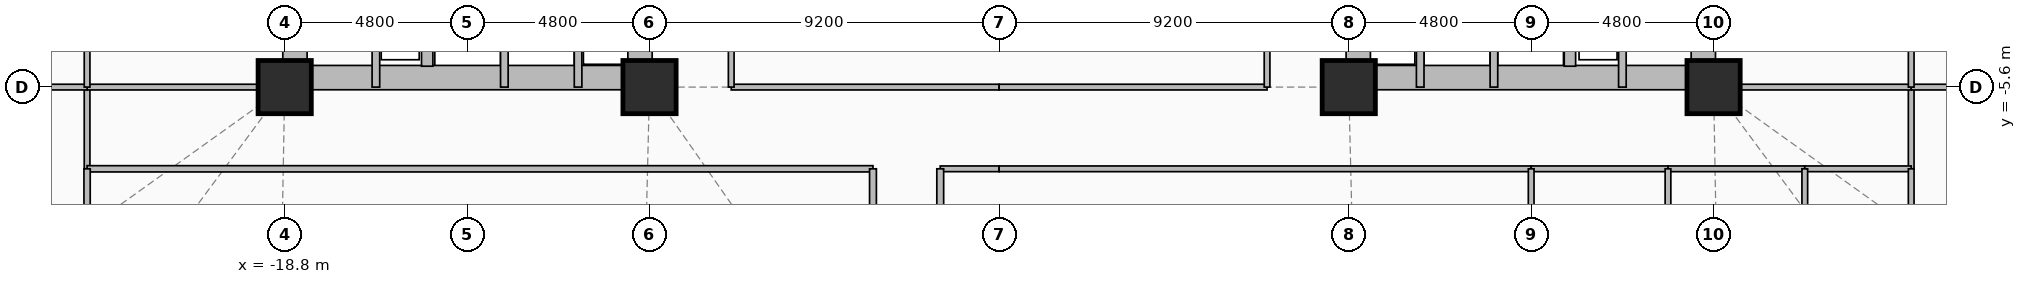
"""IFC4 building model, lengths in metres.
Left out: names, types, materials, properties, quantities, classifications, styles, units other than length and angle.
Written with IfcOpenShell. Run it as: python <this file> out.ifc"""

import sys

from ifc_helpers import new_model, si_unit, direction, frame, frame_2d, origin, origin_2d, place, context, subcontext, project, spatial, rectangle, extrude, element, fill, save


model = new_model("IFC4")
c1 = context("Model", 3, precision=1e-05, world=origin(), true_north=direction((0.0, 1.0)))
c2 = subcontext(c1, "Body", "Model", "MODEL_VIEW")
j1 = project(units=[si_unit("LENGTHUNIT", "METRE"), si_unit("PLANEANGLEUNIT", "RADIAN")], contexts=[c1])
p1 = place(None, origin())
s1 = spatial("IfcSite", under=j1, at=p1, CompositionType="ELEMENT")
p2 = place(p1, origin())
s2 = spatial("IfcBuilding", under=s1, at=p2, CompositionType="ELEMENT")
p3 = place(p2, frame((0.0, 0.0, 22.5)))
s3 = spatial("IfcBuildingStorey", under=s2, at=p3, CompositionType="ELEMENT", Elevation=22.5)
for number, where, z_axis, x_axis in (
    (1, (-18.8, -5.6, 0.0), (0.0, 0.0, 1.0), (1.0, 0.0, 0.0)),
    (2, (-9.2, -5.6, 0.0), (0.0, 0.0, 1.0), (1.0, 0.0, 0.0)),
    (3, (9.2, -5.6, 0.0), (0.0, 0.0, 1.0), (1.0, 0.0, 0.0)),
    (4, (18.8, -5.6, 0.0), (0.0, 0.0, 1.0), (1.0, 0.0, 0.0)),
):
    element("IfcColumn", number, at=place(p3, frame(where, z_axis=z_axis, x_axis=x_axis)), inside=s3, PredefinedType="COLUMN", context=c2, shape_type="SweptSolid", body=[
        extrude(rectangle(XDim=1.4, YDim=1.4, at=origin_2d()), origin(), (0.0, 0.0, 1.0), 4.5),
    ])
p4 = place(p3, frame((-18.8, -5.35, 0.0), z_axis=(0.0, 0.0, 1.0), x_axis=(1.0, 0.0, 0.0)))
e5 = element("IfcWall", 5, at=p4, inside=s3, PredefinedType="SHEAR", context=c2, shape_type="SweptSolid", body=[
    extrude(rectangle(XDim=9.6, YDim=0.64, at=frame_2d((4.8, 0.0))), origin(), (0.0, 0.0, 1.0), 4.16),
])
p5 = place(p4, frame((1.05, 0.0, 0.0)))
e6 = element("IfcOpeningElement", 6, at=p5, cuts=e5, PredefinedType="OPENING", context=c2, shape_type="SweptSolid", body=[
    extrude(rectangle(XDim=0.9, YDim=2.1, at=frame_2d((0.45, 1.05))), frame((0.0, 0.33, 0.0), z_axis=(0.0, -1.0, 0.0), x_axis=(1.0, 0.0, 0.0)), (0.0, 0.0, 1.0), 0.66),
])
p6 = place(p3, frame((-18.53, -5.05, 0.0), z_axis=(0.0, 0.0, 1.0), x_axis=(0.0, 1.0, 0.0)))
e7 = element("IfcWall", 7, at=p6, inside=s3, PredefinedType="SHEAR", context=c2, shape_type="SweptSolid", body=[
    extrude(rectangle(XDim=10.1, YDim=0.64, at=frame_2d((5.05, 0.0))), origin(), (0.0, 0.0, 1.0), 4.16),
])
p7 = place(p3, frame((-9.45, -5.05, 0.0), z_axis=(0.0, 0.0, 1.0), x_axis=(0.0, 1.0, 0.0)))
e8 = element("IfcWall", 8, at=p7, inside=s3, PredefinedType="SHEAR", context=c2, shape_type="SweptSolid", body=[
    extrude(rectangle(XDim=10.1, YDim=0.64, at=frame_2d((5.05, 0.0))), origin(), (0.0, 0.0, 1.0), 4.16),
])
p8 = place(p7, frame((7.175, 0.0, 0.0)))
e9 = element("IfcOpeningElement", 9, at=p8, cuts=e8, PredefinedType="OPENING", context=c2, shape_type="SweptSolid", body=[
    extrude(rectangle(XDim=0.9, YDim=2.1, at=frame_2d((0.45, 1.05))), frame((0.0, 0.33, 0.0), z_axis=(0.0, -1.0, 0.0), x_axis=(1.0, 0.0, 0.0)), (0.0, 0.0, 1.0), 0.66),
])
p9 = place(p7, frame((2.4, 0.0, 0.0)))
e10 = element("IfcOpeningElement", 10, at=p9, cuts=e8, PredefinedType="OPENING", context=c2, shape_type="SweptSolid", body=[
    extrude(rectangle(XDim=1.2, YDim=2.15, at=frame_2d((0.6, 1.075))), frame((0.0, 0.33, 0.0), z_axis=(0.0, -1.0, 0.0), x_axis=(1.0, 0.0, 0.0)), (0.0, 0.0, 1.0), 0.66),
])
p10 = place(p3, frame((-15.05, -5.05, 0.0), z_axis=(0.0, 0.0, 1.0), x_axis=(0.0, 1.0, 0.0)))
e11 = element("IfcWall", 11, at=p10, inside=s3, PredefinedType="SHEAR", context=c2, shape_type="SweptSolid", body=[
    extrude(rectangle(XDim=10.1, YDim=0.3, at=frame_2d((5.05, 0.0))), origin(), (0.0, 0.0, 1.0), 4.16),
])
p11 = place(p3, frame((9.2, -5.35, 0.0), z_axis=(0.0, 0.0, 1.0), x_axis=(1.0, 0.0, 0.0)))
e12 = element("IfcWall", 12, at=p11, inside=s3, PredefinedType="SHEAR", context=c2, shape_type="SweptSolid", body=[
    extrude(rectangle(XDim=9.6, YDim=0.64, at=frame_2d((4.8, 0.0))), origin(), (0.0, 0.0, 1.0), 4.16),
])
p12 = place(p11, frame((7.65, 0.0, 0.0)))
e13 = element("IfcOpeningElement", 13, at=p12, cuts=e12, PredefinedType="OPENING", context=c2, shape_type="SweptSolid", body=[
    extrude(rectangle(XDim=0.9, YDim=2.1, at=frame_2d((0.45, 1.05))), frame((0.0, 0.33, 0.0), z_axis=(0.0, -1.0, 0.0), x_axis=(1.0, 0.0, 0.0)), (0.0, 0.0, 1.0), 0.66),
])
p13 = place(p3, frame((9.45, -5.05, 0.0), z_axis=(0.0, 0.0, 1.0), x_axis=(0.0, 1.0, 0.0)))
e14 = element("IfcWall", 14, at=p13, inside=s3, PredefinedType="SHEAR", context=c2, shape_type="SweptSolid", body=[
    extrude(rectangle(XDim=10.1, YDim=0.64, at=frame_2d((5.05, 0.0))), origin(), (0.0, 0.0, 1.0), 4.16),
])
p14 = place(p13, frame((7.15, 0.0, 0.0)))
e15 = element("IfcOpeningElement", 15, at=p14, cuts=e14, PredefinedType="OPENING", context=c2, shape_type="SweptSolid", body=[
    extrude(rectangle(XDim=0.9, YDim=2.1, at=frame_2d((0.45, 1.05))), frame((0.0, 0.33, 0.0), z_axis=(0.0, -1.0, 0.0), x_axis=(1.0, 0.0, 0.0)), (0.0, 0.0, 1.0), 0.66),
])
p15 = place(p13, frame((2.4, 0.0, 0.0)))
e16 = element("IfcOpeningElement", 16, at=p15, cuts=e14, PredefinedType="OPENING", context=c2, shape_type="SweptSolid", body=[
    extrude(rectangle(XDim=1.2, YDim=2.15, at=frame_2d((0.6, 1.075))), frame((0.0, 0.33, 0.0), z_axis=(0.0, -1.0, 0.0), x_axis=(1.0, 0.0, 0.0)), (0.0, 0.0, 1.0), 0.66),
])
p16 = place(p3, frame((18.53, -5.05, 0.0), z_axis=(0.0, 0.0, 1.0), x_axis=(0.0, 1.0, 0.0)))
e17 = element("IfcWall", 17, at=p16, inside=s3, PredefinedType="SHEAR", context=c2, shape_type="SweptSolid", body=[
    extrude(rectangle(XDim=10.1, YDim=0.64, at=frame_2d((5.05, 0.0))), origin(), (0.0, 0.0, 1.0), 4.16),
])
p17 = place(p3, frame((15.02, -5.05, 0.0), z_axis=(0.0, 0.0, 1.0), x_axis=(0.0, 1.0, 0.0)))
e18 = element("IfcWall", 18, at=p17, inside=s3, PredefinedType="SHEAR", context=c2, shape_type="SweptSolid", body=[
    extrude(rectangle(XDim=10.1, YDim=0.3, at=frame_2d((5.05, 0.0))), origin(), (0.0, 0.0, 1.0), 4.16),
])
p18 = place(p3, frame((-16.4, -5.6, 0.0), z_axis=(0.0, 0.0, 1.0), x_axis=(0.0, 1.0, 0.0)))
e19 = element("IfcWall", 19, at=p18, inside=s3, PredefinedType="PARTITIONING", context=c2, shape_type="SweptSolid", body=[
    extrude(rectangle(XDim=3.49, YDim=0.2, at=frame_2d((1.745, 0.0))), origin(), (0.0, 0.0, 1.0), 4.16),
])
for number, where, z_axis, x_axis in (
    (20, (-13.02, -5.6, 0.0), (0.0, 0.0, 1.0), (0.0, 1.0, 0.0)),
    (21, (-11.08, -5.6, 0.0), (0.0, 0.0, 1.0), (0.0, 1.0, 0.0)),
):
    element("IfcWall", number, at=place(p3, frame(where, z_axis=z_axis, x_axis=x_axis)), inside=s3, PredefinedType="PARTITIONING", context=c2, shape_type="SweptSolid", body=[
        extrude(rectangle(XDim=2.25, YDim=0.2, at=frame_2d((1.125, 0.0))), origin(), (0.0, 0.0, 1.0), 4.16),
    ])
p19 = place(p3, frame((16.4, -2.11, 0.0), z_axis=(0.0, 0.0, 1.0), x_axis=(0.0, -1.0, 0.0)))
e22 = element("IfcWall", 22, at=p19, inside=s3, PredefinedType="PARTITIONING", context=c2, shape_type="SweptSolid", body=[
    extrude(rectangle(XDim=3.49, YDim=0.2, at=frame_2d((1.745, 0.0))), origin(), (0.0, 0.0, 1.0), 4.16),
])
for number, where, z_axis, x_axis in (
    (23, (11.08, -5.6, 0.0), (0.0, 0.0, 1.0), (0.0, 1.0, 0.0)),
    (24, (13.02, -5.6, 0.0), (0.0, 0.0, 1.0), (0.0, 1.0, 0.0)),
):
    element("IfcWall", number, at=place(p3, frame(where, z_axis=z_axis, x_axis=x_axis)), inside=s3, PredefinedType="PARTITIONING", context=c2, shape_type="SweptSolid", body=[
        extrude(rectangle(XDim=2.25, YDim=0.2, at=frame_2d((1.125, 0.0))), origin(), (0.0, 0.0, 1.0), 4.16),
    ])
p20 = place(p3, frame((-24.0, -7.75, 0.0), z_axis=(0.0, 0.0, 1.0), x_axis=(0.0, 1.0, 0.0)))
e25 = element("IfcWall", 25, at=p20, inside=s3, PredefinedType="PARTITIONING", context=c2, shape_type="SweptSolid", body=[
    extrude(rectangle(XDim=2.15, YDim=0.15, at=frame_2d((1.075, 0.0))), origin(), (0.0, 0.0, 1.0), 4.16),
])
p21 = place(p20, frame((0.625, 0.0, 0.0)))
e26 = element("IfcOpeningElement", 26, at=p21, cuts=e25, PredefinedType="OPENING", context=c2, shape_type="SweptSolid", body=[
    extrude(rectangle(XDim=0.9, YDim=2.1, at=frame_2d((0.45, 1.05))), frame((0.0, 0.085, 0.0), z_axis=(0.0, -1.0, 0.0), x_axis=(1.0, 0.0, 0.0)), (0.0, 0.0, 1.0), 0.17),
])
p22 = place(p3, frame((-24.0, -5.6, 0.0), z_axis=(0.0, 0.0, 1.0), x_axis=(1.0, 0.0, 0.0)))
e27 = element("IfcWall", 27, at=p22, inside=s3, PredefinedType="PARTITIONING", context=c2, shape_type="SweptSolid", body=[
    extrude(rectangle(XDim=5.2, YDim=0.15, at=frame_2d((2.6, 0.0))), origin(), (0.0, 0.0, 1.0), 4.16),
])
p23 = place(p3, frame((-3.32, -7.75, 0.0), z_axis=(0.0, 0.0, 1.0), x_axis=(-1.0, 0.0, 0.0)))
e28 = element("IfcWall", 28, at=p23, inside=s3, PredefinedType="PARTITIONING", context=c2, shape_type="SweptSolid", body=[
    extrude(rectangle(XDim=20.68, YDim=0.165, at=frame_2d((10.34, 0.0))), origin(), (0.0, 0.0, 1.0), 4.16),
])
p24 = place(p23, frame((9.64, 0.0, 0.0)))
e29 = element("IfcOpeningElement", 29, at=p24, cuts=e28, PredefinedType="OPENING", context=c2, shape_type="SweptSolid", body=[
    extrude(rectangle(XDim=1.4, YDim=2.3, at=frame_2d((0.7, 1.15))), frame((0.0, 0.093, 0.0), z_axis=(0.0, -1.0, 0.0), x_axis=(1.0, 0.0, 0.0)), (0.0, 0.0, 1.0), 0.185),
])
p25 = place(p3, frame((0.0, -7.75, 0.0), z_axis=(0.0, 0.0, 1.0), x_axis=(-1.0, 0.0, 0.0)))
e30 = element("IfcWall", 30, at=p25, inside=s3, PredefinedType="PARTITIONING", context=c2, shape_type="SweptSolid", body=[
    extrude(rectangle(XDim=1.55, YDim=0.15, at=frame_2d((0.775, 0.0))), origin(), (0.0, 0.0, 1.0), 4.16),
])
p26 = place(p3, frame((-7.05, -5.6, 0.0), z_axis=(0.0, 0.0, 1.0), x_axis=(1.0, 0.0, 0.0)))
e31 = element("IfcWall", 31, at=p26, inside=s3, PredefinedType="PARTITIONING", context=c2, shape_type="SweptSolid", body=[
    extrude(rectangle(XDim=7.05, YDim=0.15, at=frame_2d((3.525, 0.0))), origin(), (0.0, 0.0, 1.0), 3.137),
])
p27 = place(p3, frame((24.0, -5.6, 0.0), z_axis=(0.0, 0.0, 1.0), x_axis=(0.0, -1.0, 0.0)))
e32 = element("IfcWall", 32, at=p27, inside=s3, PredefinedType="PARTITIONING", context=c2, shape_type="SweptSolid", body=[
    extrude(rectangle(XDim=2.15, YDim=0.15, at=frame_2d((1.075, 0.0))), origin(), (0.0, 0.0, 1.0), 4.16),
])
p28 = place(p27, frame((0.625, 0.0, 0.0)))
e33 = element("IfcOpeningElement", 33, at=p28, cuts=e32, PredefinedType="OPENING", context=c2, shape_type="SweptSolid", body=[
    extrude(rectangle(XDim=0.9, YDim=2.1, at=frame_2d((0.45, 1.05))), frame((0.0, 0.085, 0.0), z_axis=(0.0, -1.0, 0.0), x_axis=(1.0, 0.0, 0.0)), (0.0, 0.0, 1.0), 0.17),
])
p29 = place(p3, frame((18.8, -5.6, 0.0), z_axis=(0.0, 0.0, 1.0), x_axis=(1.0, 0.0, 0.0)))
e34 = element("IfcWall", 34, at=p29, inside=s3, PredefinedType="PARTITIONING", context=c2, shape_type="SweptSolid", body=[
    extrude(rectangle(XDim=5.2, YDim=0.15, at=frame_2d((2.6, 0.0))), origin(), (0.0, 0.0, 1.0), 4.16),
])
p30 = place(p3, frame((14.0, -7.75, 0.0), z_axis=(0.0, 0.0, 1.0), x_axis=(-1.0, 0.0, 0.0)))
e35 = element("IfcWall", 35, at=p30, inside=s3, PredefinedType="PARTITIONING", context=c2, shape_type="SweptSolid", body=[
    extrude(rectangle(XDim=14.0, YDim=0.15, at=frame_2d((7.0, 0.0))), origin(), (0.0, 0.0, 1.0), 4.16),
])
p31 = place(p30, frame((10.59, 0.0, 0.0)))
e36 = element("IfcOpeningElement", 36, at=p31, cuts=e35, PredefinedType="OPENING", context=c2, shape_type="SweptSolid", body=[
    extrude(rectangle(XDim=1.4, YDim=2.3, at=frame_2d((0.7, 1.15))), frame((0.0, 0.085, 0.0), z_axis=(0.0, -1.0, 0.0), x_axis=(1.0, 0.0, 0.0)), (0.0, 0.0, 1.0), 0.17),
])
p32 = place(p3, frame((17.6, -7.75, 0.0), z_axis=(0.0, 0.0, 1.0), x_axis=(-1.0, 0.0, 0.0)))
e37 = element("IfcWall", 37, at=p32, inside=s3, PredefinedType="PLUMBINGWALL", context=c2, shape_type="SweptSolid", body=[
    extrude(rectangle(XDim=3.6, YDim=0.15, at=frame_2d((1.8, 0.0))), origin(), (0.0, 0.0, 1.0), 4.16),
])
p33 = place(p32, frame((1.927, 0.0, 0.0)))
e38 = element("IfcOpeningElement", 38, at=p33, cuts=e37, PredefinedType="OPENING", context=c2, shape_type="SweptSolid", body=[
    extrude(rectangle(XDim=0.9, YDim=2.1, at=frame_2d((0.45, 1.05))), frame((0.0, 0.085, 0.0), z_axis=(0.0, -1.0, 0.0), x_axis=(1.0, 0.0, 0.0)), (0.0, 0.0, 1.0), 0.17),
])
p34 = place(p3, frame((21.2, -7.75, 0.0), z_axis=(0.0, 0.0, 1.0), x_axis=(-1.0, 0.0, 0.0)))
e39 = element("IfcWall", 39, at=p34, inside=s3, PredefinedType="PLUMBINGWALL", context=c2, shape_type="SweptSolid", body=[
    extrude(rectangle(XDim=3.6, YDim=0.15, at=frame_2d((1.8, 0.0))), origin(), (0.0, 0.0, 1.0), 4.16),
])
p35 = place(p34, frame((0.772, 0.0, 0.0)))
e40 = element("IfcOpeningElement", 40, at=p35, cuts=e39, PredefinedType="OPENING", context=c2, shape_type="SweptSolid", body=[
    extrude(rectangle(XDim=0.9, YDim=2.1, at=frame_2d((0.45, 1.05))), frame((0.0, 0.085, 0.0), z_axis=(0.0, -1.0, 0.0), x_axis=(1.0, 0.0, 0.0)), (0.0, 0.0, 1.0), 0.17),
])
p36 = place(p3, frame((24.0, -7.75, 0.0), z_axis=(0.0, 0.0, 1.0), x_axis=(-1.0, 0.0, 0.0)))
e41 = element("IfcWall", 41, at=p36, inside=s3, PredefinedType="PARTITIONING", context=c2, shape_type="SweptSolid", body=[
    extrude(rectangle(XDim=2.8, YDim=0.15, at=frame_2d((1.4, 0.0))), origin(), (0.0, 0.0, 1.0), 4.16),
])
p37 = place(p36, frame((0.666, 0.0, 0.0)))
e42 = element("IfcOpeningElement", 42, at=p37, cuts=e41, PredefinedType="OPENING", context=c2, shape_type="SweptSolid", body=[
    extrude(rectangle(XDim=0.95, YDim=2.1, at=frame_2d((0.475, 1.05))), frame((0.0, 0.085, 0.0), z_axis=(0.0, -1.0, 0.0), x_axis=(1.0, 0.0, 0.0)), (0.0, 0.0, 1.0), 0.17),
])
p38 = place(p3, frame((0.0, -5.6, 0.0), z_axis=(0.0, 0.0, 1.0), x_axis=(1.0, 0.0, 0.0)))
e43 = element("IfcWall", 43, at=p38, inside=s3, PredefinedType="PARTITIONING", context=c2, shape_type="SweptSolid", body=[
    extrude(rectangle(XDim=7.05, YDim=0.15, at=frame_2d((3.525, 0.0))), origin(), (0.0, 0.0, 1.0), 3.137),
])
p39 = place(p3, frame((-7.05, 8.5, 0.0), z_axis=(0.0, 0.0, 1.0), x_axis=(0.0, -1.0, 0.0)))
e44 = element("IfcWall", 44, at=p39, inside=s3, PredefinedType="PARTITIONING", context=c2, shape_type="SweptSolid", body=[
    extrude(rectangle(XDim=14.1, YDim=0.15, at=frame_2d((7.05, 0.0))), origin(), (0.0, 0.0, 1.0), 4.16),
])
p40 = place(p39, frame((8.011, 0.0, 0.0)))
e45 = element("IfcOpeningElement", 45, at=p40, cuts=e44, PredefinedType="OPENING", context=c2, shape_type="SweptSolid", body=[
    extrude(rectangle(XDim=1.05, YDim=2.15, at=frame_2d((0.525, 1.075))), frame((0.0, 0.085, 0.0), z_axis=(0.0, -1.0, 0.0), x_axis=(1.0, 0.0, 0.0)), (0.0, 0.0, 1.0), 0.17),
])
p41 = place(p3, frame((7.05, -5.6, 0.0), z_axis=(0.0, 0.0, 1.0), x_axis=(0.0, 1.0, 0.0)))
e46 = element("IfcWall", 46, at=p41, inside=s3, PredefinedType="PARTITIONING", context=c2, shape_type="SweptSolid", body=[
    extrude(rectangle(XDim=14.1, YDim=0.15, at=frame_2d((7.05, 0.0))), origin(), (0.0, 0.0, 1.0), 4.16),
])
for number, where, z_axis, x_axis in (
    (47, (-3.32, -14.86, 0.0), (0.0, 0.0, 1.0), (0.0, 1.0, 0.0)),
    (48, (-1.55, -7.75, 0.0), (0.0, 0.0, 1.0), (0.0, -1.0, 0.0)),
):
    element("IfcWall", number, at=place(p3, frame(where, z_axis=z_axis, x_axis=x_axis)), inside=s3, PredefinedType="PARTITIONING", context=c2, shape_type="SweptSolid", body=[
        extrude(rectangle(XDim=7.11, YDim=0.18, at=frame_2d((3.555, 0.0))), origin(), (0.0, 0.0, 1.0), 4.16),
    ])
p42 = place(p3, frame((-24.0, -5.6, 0.0), z_axis=(0.0, 0.0, 1.0), x_axis=(-1.0, 0.0, 0.0)))
e49 = element("IfcWall", 49, at=p42, inside=s3, PredefinedType="PARTITIONING", context=c2, shape_type="SweptSolid", body=[
    extrude(rectangle(XDim=2.65, YDim=0.15, at=frame_2d((1.325, 0.0))), origin(), (0.0, 0.0, 1.0), 4.16),
])
p43 = place(p42, frame((0.965, 0.0, 0.0)))
e50 = element("IfcOpeningElement", 50, at=p43, cuts=e49, PredefinedType="OPENING", context=c2, shape_type="SweptSolid", body=[
    extrude(rectangle(XDim=1.05, YDim=2.15, at=frame_2d((0.525, 1.075))), frame((0.0, 0.085, 0.0), z_axis=(0.0, -1.0, 0.0), x_axis=(1.0, 0.0, 0.0)), (0.0, 0.0, 1.0), 0.17),
])
p44 = place(p3, frame((-24.0, 8.5, 0.0), z_axis=(0.0, 0.0, 1.0), x_axis=(0.0, -1.0, 0.0)))
e51 = element("IfcWall", 51, at=p44, inside=s3, PredefinedType="PARTITIONING", context=c2, shape_type="SweptSolid", body=[
    extrude(rectangle(XDim=14.1, YDim=0.15, at=frame_2d((7.05, 0.0))), origin(), (0.0, 0.0, 1.0), 4.16),
])
p45 = place(p3, frame((-24.0, -7.75, 0.0), z_axis=(0.0, 0.0, 1.0), x_axis=(0.0, -1.0, 0.0)))
e52 = element("IfcWall", 52, at=p45, inside=s3, PredefinedType="PARTITIONING", context=c2, shape_type="SweptSolid", body=[
    extrude(rectangle(XDim=14.05, YDim=0.165, at=frame_2d((7.025, 0.0))), origin(), (0.0, 0.0, 1.0), 4.16),
])
p46 = place(p3, frame((26.65, -5.6, 0.0), z_axis=(0.0, 0.0, 1.0), x_axis=(-1.0, 0.0, 0.0)))
e53 = element("IfcWall", 53, at=p46, inside=s3, PredefinedType="PARTITIONING", context=c2, shape_type="SweptSolid", body=[
    extrude(rectangle(XDim=2.65, YDim=0.15, at=frame_2d((1.325, 0.0))), origin(), (0.0, 0.0, 1.0), 4.16),
])
p47 = place(p46, frame((0.635, 0.0, 0.0)))
e54 = element("IfcOpeningElement", 54, at=p47, cuts=e53, PredefinedType="OPENING", context=c2, shape_type="SweptSolid", body=[
    extrude(rectangle(XDim=1.05, YDim=2.15, at=frame_2d((0.525, 1.075))), frame((0.0, 0.085, 0.0), z_axis=(0.0, -1.0, 0.0), x_axis=(1.0, 0.0, 0.0)), (0.0, 0.0, 1.0), 0.17),
])
p48 = place(p3, frame((24.0, -5.6, 0.0), z_axis=(0.0, 0.0, 1.0), x_axis=(0.0, 1.0, 0.0)))
e55 = element("IfcWall", 55, at=p48, inside=s3, PredefinedType="PARTITIONING", context=c2, shape_type="SweptSolid", body=[
    extrude(rectangle(XDim=14.1, YDim=0.15, at=frame_2d((7.05, 0.0))), origin(), (0.0, 0.0, 1.0), 4.16),
])
p49 = place(p3, frame((24.0, -11.35, 0.0), z_axis=(0.0, 0.0, 1.0), x_axis=(0.0, 1.0, 0.0)))
e56 = element("IfcWall", 56, at=p49, inside=s3, PredefinedType="PARTITIONING", context=c2, shape_type="SweptSolid", body=[
    extrude(rectangle(XDim=3.6, YDim=0.15, at=frame_2d((1.8, 0.0))), origin(), (0.0, 0.0, 1.0), 4.16),
])
for number, where, z_axis, x_axis in (
    (57, (14.0, -7.75, 0.0), (0.0, 0.0, 1.0), (0.0, -1.0, 0.0)),
    (58, (17.6, -7.75, 0.0), (0.0, 0.0, 1.0), (0.0, -1.0, 0.0)),
    (59, (21.2, -7.75, 0.0), (0.0, 0.0, 1.0), (0.0, -1.0, 0.0)),
):
    element("IfcWall", number, at=place(p3, frame(where, z_axis=z_axis, x_axis=x_axis)), inside=s3, PredefinedType="PLUMBINGWALL", context=c2, shape_type="SweptSolid", body=[
        extrude(rectangle(XDim=3.6, YDim=0.15, at=frame_2d((1.8, 0.0))), origin(), (0.0, 0.0, 1.0), 4.16),
    ])
p50 = place(p5, origin())
e60 = element("IfcDoor", 60, at=p50, inside=s3, OperationType="SINGLE_SWING_LEFT", PredefinedType="DOOR", context=c2, shape_type="SweptSolid", body=[
    extrude(rectangle(XDim=0.9, YDim=2.1, at=frame_2d((0.45, 1.05))), frame((0.0, 0.025, 0.0), z_axis=(0.0, -1.0, 0.0), x_axis=(1.0, 0.0, 0.0)), (0.0, 0.0, 1.0), 0.05),
])
fill(e6, e60)
p51 = place(p12, origin())
e61 = element("IfcDoor", 61, at=p51, inside=s3, OperationType="SINGLE_SWING_RIGHT", PredefinedType="DOOR", context=c2, shape_type="SweptSolid", body=[
    extrude(rectangle(XDim=0.9, YDim=2.1, at=frame_2d((0.45, 1.05))), frame((0.0, 0.025, 0.0), z_axis=(0.0, -1.0, 0.0), x_axis=(1.0, 0.0, 0.0)), (0.0, 0.0, 1.0), 0.05),
])
fill(e13, e61)
p52 = place(p21, origin())
e62 = element("IfcDoor", 62, at=p52, inside=s3, OperationType="SINGLE_SWING_RIGHT", PredefinedType="DOOR", context=c2, shape_type="SweptSolid", body=[
    extrude(rectangle(XDim=0.9, YDim=2.1, at=frame_2d((0.45, 1.05))), frame((0.0, 0.025, 0.0), z_axis=(0.0, -1.0, 0.0), x_axis=(1.0, 0.0, 0.0)), (0.0, 0.0, 1.0), 0.05),
])
fill(e26, e62)
p53 = place(p24, origin())
e63 = element("IfcDoor", 63, at=p53, inside=s3, OperationType="SINGLE_SWING_LEFT", PredefinedType="DOOR", context=c2, shape_type="SweptSolid", body=[
    extrude(rectangle(XDim=1.4, YDim=2.3, at=frame_2d((0.7, 1.15))), frame((0.0, 0.025, 0.0), z_axis=(0.0, -1.0, 0.0), x_axis=(1.0, 0.0, 0.0)), (0.0, 0.0, 1.0), 0.05),
])
fill(e29, e63)
p54 = place(p28, origin())
e64 = element("IfcDoor", 64, at=p54, inside=s3, OperationType="SINGLE_SWING_RIGHT", PredefinedType="DOOR", context=c2, shape_type="SweptSolid", body=[
    extrude(rectangle(XDim=0.9, YDim=2.1, at=frame_2d((0.45, 1.05))), frame((0.0, 0.025, 0.0), z_axis=(0.0, -1.0, 0.0), x_axis=(1.0, 0.0, 0.0)), (0.0, 0.0, 1.0), 0.05),
])
fill(e33, e64)
p55 = place(p31, origin())
e65 = element("IfcDoor", 65, at=p55, inside=s3, OperationType="SINGLE_SWING_LEFT", PredefinedType="DOOR", context=c2, shape_type="SweptSolid", body=[
    extrude(rectangle(XDim=1.4, YDim=2.3, at=frame_2d((0.7, 1.15))), frame((0.0, 0.025, 0.0), z_axis=(0.0, -1.0, 0.0), x_axis=(1.0, 0.0, 0.0)), (0.0, 0.0, 1.0), 0.05),
])
fill(e36, e65)
p56 = place(p33, origin())
e66 = element("IfcDoor", 66, at=p56, inside=s3, OperationType="SINGLE_SWING_RIGHT", PredefinedType="DOOR", context=c2, shape_type="SweptSolid", body=[
    extrude(rectangle(XDim=0.9, YDim=2.1, at=frame_2d((0.45, 1.05))), frame((0.0, 0.025, 0.0), z_axis=(0.0, -1.0, 0.0), x_axis=(1.0, 0.0, 0.0)), (0.0, 0.0, 1.0), 0.05),
])
fill(e38, e66)
p57 = place(p35, origin())
e67 = element("IfcDoor", 67, at=p57, inside=s3, OperationType="SINGLE_SWING_LEFT", PredefinedType="DOOR", context=c2, shape_type="SweptSolid", body=[
    extrude(rectangle(XDim=0.9, YDim=2.1, at=frame_2d((0.45, 1.05))), frame((0.0, 0.025, 0.0), z_axis=(0.0, -1.0, 0.0), x_axis=(1.0, 0.0, 0.0)), (0.0, 0.0, 1.0), 0.05),
])
fill(e40, e67)
p58 = place(p37, origin())
e68 = element("IfcDoor", 68, at=p58, inside=s3, OperationType="SINGLE_SWING_RIGHT", PredefinedType="DOOR", context=c2, shape_type="SweptSolid", body=[
    extrude(rectangle(XDim=0.95, YDim=2.1, at=frame_2d((0.475, 1.05))), frame((0.0, 0.025, 0.0), z_axis=(0.0, -1.0, 0.0), x_axis=(1.0, 0.0, 0.0)), (0.0, 0.0, 1.0), 0.05),
])
fill(e42, e68)
save(model, sys.argv[1])
